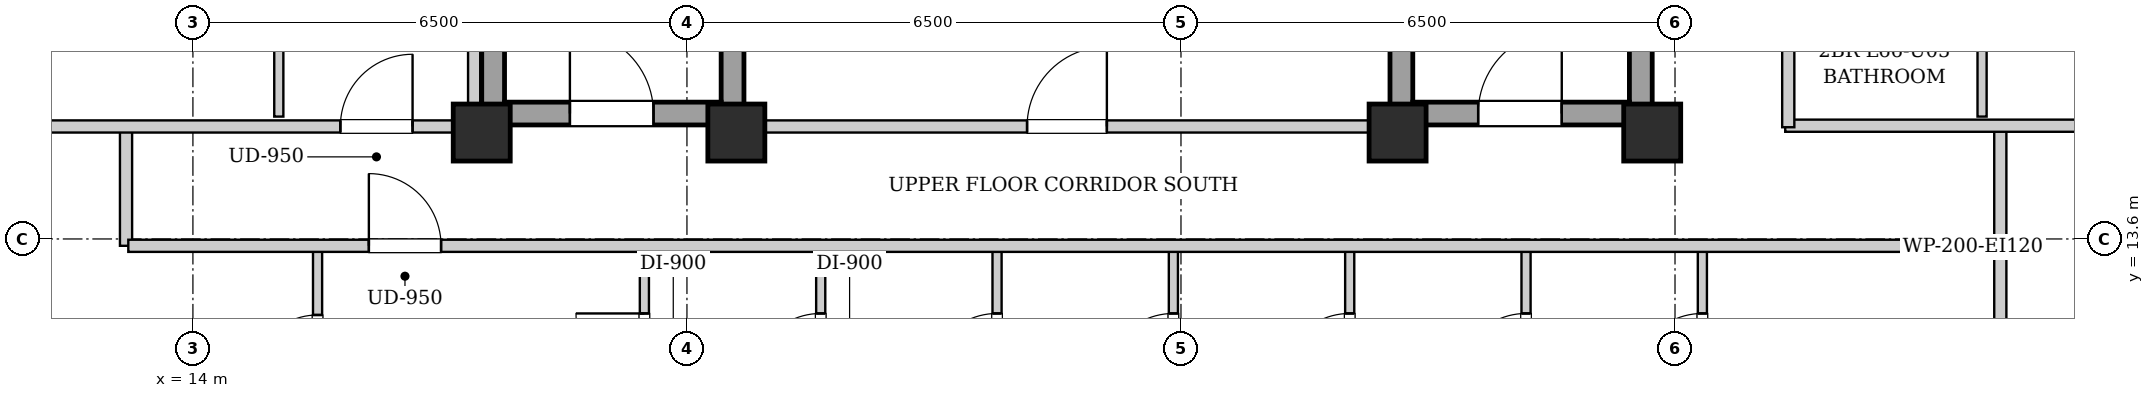
"""IFC4 building model, lengths in metres.
Left out: names, types, materials, properties, quantities, classifications, styles, units other than length and angle.
Written with IfcOpenShell. Run it as: python <this file> out.ifc"""

import sys

from ifc_helpers import new_model, si_unit, direction, frame, frame_2d, origin, origin_2d, place, context, subcontext, project, spatial, rectangle, extrude, element, fill, save


model = new_model("IFC4")
c1 = context("Model", 3, precision=1e-05, world=origin(), true_north=direction((0.0, 1.0)))
c2 = subcontext(c1, "Body", "Model", "MODEL_VIEW")
j1 = project(units=[si_unit("LENGTHUNIT", "METRE"), si_unit("PLANEANGLEUNIT", "RADIAN")], contexts=[c1])
p1 = place(None, origin())
s1 = spatial("IfcSite", under=j1, at=p1, CompositionType="ELEMENT")
p2 = place(p1, origin())
s2 = spatial("IfcBuilding", under=s1, at=p2, CompositionType="ELEMENT")
p3 = place(p2, frame((0.0, 0.0, 227.5)))
s3 = spatial("IfcBuildingStorey", under=s2, at=p3, CompositionType="ELEMENT", Elevation=227.5)
for number, where, z_axis, x_axis in (
    (1, (17.8, 15.0, 0.0), (0.0, 0.0, 1.0), (1.0, 0.0, 0.0)),
    (2, (21.15, 15.0, 0.0), (0.0, 0.0, 1.0), (1.0, 0.0, 0.0)),
    (3, (29.85, 15.0, 0.0), (0.0, 0.0, 1.0), (1.0, 0.0, 0.0)),
    (4, (33.2, 15.0, 0.0), (0.0, 0.0, 1.0), (1.0, 0.0, 0.0)),
):
    element("IfcColumn", number, at=place(p3, frame(where, z_axis=z_axis, x_axis=x_axis)), inside=s3, PredefinedType="COLUMN", context=c2, shape_type="SweptSolid", body=[
        extrude(rectangle(XDim=0.75, YDim=0.75, at=origin_2d()), origin(), (0.0, 0.0, 1.0), 3.4),
    ])
for number, where, z_axis, x_axis in (
    (5, (17.95, 15.1, 0.0), (0.0, 0.0, 1.0), (0.0, 1.0, 0.0)),
    (6, (21.1, 15.1, 0.0), (0.0, 0.0, 1.0), (0.0, 1.0, 0.0)),
):
    element("IfcWall", number, at=place(p3, frame(where, z_axis=z_axis, x_axis=x_axis)), inside=s3, PredefinedType="SHEAR", context=c2, shape_type="SweptSolid", body=[
        extrude(rectangle(XDim=9.0, YDim=0.3, at=frame_2d((4.5, 0.0))), origin(), (0.0, 0.0, 1.0), 3.14),
    ])
p4 = place(p3, frame((18.1, 15.25, 0.0), z_axis=(0.0, 0.0, 1.0), x_axis=(1.0, 0.0, 0.0)))
e7 = element("IfcWall", 7, at=p4, inside=s3, PredefinedType="SHEAR", context=c2, shape_type="SweptSolid", body=[
    extrude(rectangle(XDim=2.85, YDim=0.3, at=frame_2d((1.425, 0.0))), origin(), (0.0, 0.0, 1.0), 3.14),
])
p5 = place(p4, frame((0.86, 0.0, 0.0)))
e8 = element("IfcOpeningElement", 8, at=p5, cuts=e7, PredefinedType="OPENING", context=c2, shape_type="SweptSolid", body=[
    extrude(rectangle(XDim=1.1, YDim=2.05, at=frame_2d((0.55, 1.025))), frame((0.0, 0.16, 0.0), z_axis=(0.0, -1.0, 0.0), x_axis=(1.0, 0.0, 0.0)), (0.0, 0.0, 1.0), 0.32),
])
for number, where, z_axis, x_axis in (
    (9, (29.9, 15.1, 0.0), (0.0, 0.0, 1.0), (0.0, 1.0, 0.0)),
    (10, (33.05, 15.1, 0.0), (0.0, 0.0, 1.0), (0.0, 1.0, 0.0)),
):
    element("IfcWall", number, at=place(p3, frame(where, z_axis=z_axis, x_axis=x_axis)), inside=s3, PredefinedType="SHEAR", context=c2, shape_type="SweptSolid", body=[
        extrude(rectangle(XDim=9.0, YDim=0.3, at=frame_2d((4.5, 0.0))), origin(), (0.0, 0.0, 1.0), 3.14),
    ])
p6 = place(p3, frame((30.05, 15.25, 0.0), z_axis=(0.0, 0.0, 1.0), x_axis=(1.0, 0.0, 0.0)))
e11 = element("IfcWall", 11, at=p6, inside=s3, PredefinedType="SHEAR", context=c2, shape_type="SweptSolid", body=[
    extrude(rectangle(XDim=2.85, YDim=0.3, at=frame_2d((1.425, 0.0))), origin(), (0.0, 0.0, 1.0), 3.14),
])
p7 = place(p6, frame((0.86, 0.0, 0.0)))
e12 = element("IfcOpeningElement", 12, at=p7, cuts=e11, PredefinedType="OPENING", context=c2, shape_type="SweptSolid", body=[
    extrude(rectangle(XDim=1.1, YDim=2.05, at=frame_2d((0.55, 1.025))), frame((0.0, 0.16, 0.0), z_axis=(0.0, -1.0, 0.0), x_axis=(1.0, 0.0, 0.0)), (0.0, 0.0, 1.0), 0.32),
])
p8 = place(p3, frame((21.25, 15.08, 0.0), z_axis=(0.0, 0.0, 1.0), x_axis=(1.0, 0.0, 0.0)))
e13 = element("IfcWall", 13, at=p8, inside=s3, PredefinedType="PARTITIONING", context=c2, shape_type="SweptSolid", body=[
    extrude(rectangle(XDim=8.5, YDim=0.16, at=frame_2d((4.25, 0.0))), origin(), (0.0, 0.0, 1.0), 2.668),
])
p9 = place(p8, frame((3.725, 0.0, 0.0)))
e14 = element("IfcOpeningElement", 14, at=p9, cuts=e13, PredefinedType="OPENING", context=c2, shape_type="SweptSolid", body=[
    extrude(rectangle(XDim=1.05, YDim=2.05, at=frame_2d((0.525, 1.025))), frame((0.0, 0.09, 0.0), z_axis=(0.0, -1.0, 0.0), x_axis=(1.0, 0.0, 0.0)), (0.0, 0.0, 1.0), 0.18),
])
for number, where, z_axis, x_axis in (
    (15, (13.12, 13.51, 0.0), (0.0, 0.0, 1.0), (0.0, 1.0, 0.0)),
    (16, (37.78, 13.51, 0.0), (0.0, 0.0, 1.0), (0.0, 1.0, 0.0)),
):
    element("IfcWall", number, at=place(p3, frame(where, z_axis=z_axis, x_axis=x_axis)), inside=s3, PredefinedType="PARTITIONING", context=c2, shape_type="SweptSolid", body=[
        extrude(rectangle(XDim=1.58, YDim=0.16, at=frame_2d((0.79, 0.0))), origin(), (0.0, 0.0, 1.0), 3.14),
    ])
p10 = place(p3, frame((34.95, 15.09, 0.0), z_axis=(0.0, 0.0, 1.0), x_axis=(1.0, 0.0, 0.0)))
e17 = element("IfcWall", 17, at=p10, inside=s3, PredefinedType="PARTITIONING", context=c2, shape_type="SweptSolid", body=[
    extrude(rectangle(XDim=5.07, YDim=0.16, at=frame_2d((2.535, 0.0))), origin(), (0.0, 0.0, 1.0), 2.668),
])
p11 = place(p3, frame((37.78, 10.81, 0.0), z_axis=(0.0, 0.0, 1.0), x_axis=(0.0, 1.0, 0.0)))
e18 = element("IfcWall", 18, at=p11, inside=s3, PredefinedType="PARTITIONING", context=c2, shape_type="SweptSolid", body=[
    extrude(rectangle(XDim=2.66, YDim=0.16, at=frame_2d((1.33, 0.0))), origin(), (0.0, 0.0, 1.0), 3.14),
])
p12 = place(p3, frame((15.64, 10.87, 0.0), z_axis=(0.0, 0.0, 1.0), x_axis=(0.0, 1.0, 0.0)))
e19 = element("IfcWall", 19, at=p12, inside=s3, PredefinedType="PARTITIONING", context=c2, shape_type="SweptSolid", body=[
    extrude(rectangle(XDim=2.6, YDim=0.12, at=frame_2d((1.3, 0.0))), origin(), (0.0, 0.0, 1.0), 3.14),
])
p13 = place(p12, frame((0.87, 0.0, 0.0)))
e20 = element("IfcOpeningElement", 20, at=p13, cuts=e19, PredefinedType="OPENING", context=c2, shape_type="SweptSolid", body=[
    extrude(rectangle(XDim=0.86, YDim=2.05, at=frame_2d((0.43, 1.025))), frame((0.0, 0.07, 0.0), z_axis=(0.0, -1.0, 0.0), x_axis=(1.0, 0.0, 0.0)), (0.0, 0.0, 1.0), 0.14),
])
p14 = place(p3, frame((19.94, 10.87, 0.0), z_axis=(0.0, 0.0, 1.0), x_axis=(0.0, 1.0, 0.0)))
e21 = element("IfcWall", 21, at=p14, inside=s3, PredefinedType="PARTITIONING", context=c2, shape_type="SweptSolid", body=[
    extrude(rectangle(XDim=2.6, YDim=0.12, at=frame_2d((1.3, 0.0))), origin(), (0.0, 0.0, 1.0), 3.14),
])
p15 = place(p14, frame((0.85, 0.0, 0.0)))
e22 = element("IfcOpeningElement", 22, at=p15, cuts=e21, PredefinedType="OPENING", context=c2, shape_type="SweptSolid", body=[
    extrude(rectangle(XDim=0.9, YDim=2.05, at=frame_2d((0.45, 1.025))), frame((0.0, 0.07, 0.0), z_axis=(0.0, -1.0, 0.0), x_axis=(1.0, 0.0, 0.0)), (0.0, 0.0, 1.0), 0.14),
])
p16 = place(p3, frame((22.26, 10.87, 0.0), z_axis=(0.0, 0.0, 1.0), x_axis=(0.0, 1.0, 0.0)))
e23 = element("IfcWall", 23, at=p16, inside=s3, PredefinedType="PARTITIONING", context=c2, shape_type="SweptSolid", body=[
    extrude(rectangle(XDim=2.6, YDim=0.12, at=frame_2d((1.3, 0.0))), origin(), (0.0, 0.0, 1.0), 3.14),
])
p17 = place(p16, frame((0.85, 0.0, 0.0)))
e24 = element("IfcOpeningElement", 24, at=p17, cuts=e23, PredefinedType="OPENING", context=c2, shape_type="SweptSolid", body=[
    extrude(rectangle(XDim=0.9, YDim=2.05, at=frame_2d((0.45, 1.025))), frame((0.0, 0.07, 0.0), z_axis=(0.0, -1.0, 0.0), x_axis=(1.0, 0.0, 0.0)), (0.0, 0.0, 1.0), 0.14),
])
p18 = place(p3, frame((24.58, 10.87, 0.0), z_axis=(0.0, 0.0, 1.0), x_axis=(0.0, 1.0, 0.0)))
e25 = element("IfcWall", 25, at=p18, inside=s3, PredefinedType="PARTITIONING", context=c2, shape_type="SweptSolid", body=[
    extrude(rectangle(XDim=2.6, YDim=0.12, at=frame_2d((1.3, 0.0))), origin(), (0.0, 0.0, 1.0), 3.14),
])
p19 = place(p18, frame((0.85, 0.0, 0.0)))
e26 = element("IfcOpeningElement", 26, at=p19, cuts=e25, PredefinedType="OPENING", context=c2, shape_type="SweptSolid", body=[
    extrude(rectangle(XDim=0.9, YDim=2.05, at=frame_2d((0.45, 1.025))), frame((0.0, 0.07, 0.0), z_axis=(0.0, -1.0, 0.0), x_axis=(1.0, 0.0, 0.0)), (0.0, 0.0, 1.0), 0.14),
])
p20 = place(p3, frame((26.9, 10.87, 0.0), z_axis=(0.0, 0.0, 1.0), x_axis=(0.0, 1.0, 0.0)))
e27 = element("IfcWall", 27, at=p20, inside=s3, PredefinedType="PARTITIONING", context=c2, shape_type="SweptSolid", body=[
    extrude(rectangle(XDim=2.6, YDim=0.12, at=frame_2d((1.3, 0.0))), origin(), (0.0, 0.0, 1.0), 3.14),
])
p21 = place(p20, frame((0.85, 0.0, 0.0)))
e28 = element("IfcOpeningElement", 28, at=p21, cuts=e27, PredefinedType="OPENING", context=c2, shape_type="SweptSolid", body=[
    extrude(rectangle(XDim=0.9, YDim=2.05, at=frame_2d((0.45, 1.025))), frame((0.0, 0.07, 0.0), z_axis=(0.0, -1.0, 0.0), x_axis=(1.0, 0.0, 0.0)), (0.0, 0.0, 1.0), 0.14),
])
p22 = place(p3, frame((29.22, 10.87, 0.0), z_axis=(0.0, 0.0, 1.0), x_axis=(0.0, 1.0, 0.0)))
e29 = element("IfcWall", 29, at=p22, inside=s3, PredefinedType="PARTITIONING", context=c2, shape_type="SweptSolid", body=[
    extrude(rectangle(XDim=2.6, YDim=0.12, at=frame_2d((1.3, 0.0))), origin(), (0.0, 0.0, 1.0), 3.14),
])
p23 = place(p22, frame((0.85, 0.0, 0.0)))
e30 = element("IfcOpeningElement", 30, at=p23, cuts=e29, PredefinedType="OPENING", context=c2, shape_type="SweptSolid", body=[
    extrude(rectangle(XDim=0.9, YDim=2.05, at=frame_2d((0.45, 1.025))), frame((0.0, 0.07, 0.0), z_axis=(0.0, -1.0, 0.0), x_axis=(1.0, 0.0, 0.0)), (0.0, 0.0, 1.0), 0.14),
])
p24 = place(p3, frame((31.54, 10.87, 0.0), z_axis=(0.0, 0.0, 1.0), x_axis=(0.0, 1.0, 0.0)))
e31 = element("IfcWall", 31, at=p24, inside=s3, PredefinedType="PARTITIONING", context=c2, shape_type="SweptSolid", body=[
    extrude(rectangle(XDim=2.6, YDim=0.12, at=frame_2d((1.3, 0.0))), origin(), (0.0, 0.0, 1.0), 3.14),
])
p25 = place(p24, frame((0.85, 0.0, 0.0)))
e32 = element("IfcOpeningElement", 32, at=p25, cuts=e31, PredefinedType="OPENING", context=c2, shape_type="SweptSolid", body=[
    extrude(rectangle(XDim=0.9, YDim=2.05, at=frame_2d((0.45, 1.025))), frame((0.0, 0.07, 0.0), z_axis=(0.0, -1.0, 0.0), x_axis=(1.0, 0.0, 0.0)), (0.0, 0.0, 1.0), 0.14),
])
p26 = place(p3, frame((33.86, 10.87, 0.0), z_axis=(0.0, 0.0, 1.0), x_axis=(0.0, 1.0, 0.0)))
e33 = element("IfcWall", 33, at=p26, inside=s3, PredefinedType="PARTITIONING", context=c2, shape_type="SweptSolid", body=[
    extrude(rectangle(XDim=2.6, YDim=0.12, at=frame_2d((1.3, 0.0))), origin(), (0.0, 0.0, 1.0), 3.14),
])
p27 = place(p26, frame((0.85, 0.0, 0.0)))
e34 = element("IfcOpeningElement", 34, at=p27, cuts=e33, PredefinedType="OPENING", context=c2, shape_type="SweptSolid", body=[
    extrude(rectangle(XDim=0.9, YDim=2.05, at=frame_2d((0.45, 1.025))), frame((0.0, 0.07, 0.0), z_axis=(0.0, -1.0, 0.0), x_axis=(1.0, 0.0, 0.0)), (0.0, 0.0, 1.0), 0.14),
])
p28 = place(p3, frame((10.88, 15.08, 0.0), z_axis=(0.0, 0.0, 1.0), x_axis=(1.0, 0.0, 0.0)))
e35 = element("IfcWall", 35, at=p28, inside=s3, PredefinedType="PARTITIONING", context=c2, shape_type="SweptSolid", body=[
    extrude(rectangle(XDim=6.88, YDim=0.16, at=frame_2d((3.44, 0.0))), origin(), (0.0, 0.0, 1.0), 2.668),
])
p29 = place(p28, frame((5.06, 0.0, 0.0)))
e36 = element("IfcOpeningElement", 36, at=p29, cuts=e35, PredefinedType="OPENING", context=c2, shape_type="SweptSolid", body=[
    extrude(rectangle(XDim=0.95, YDim=2.1, at=frame_2d((0.475, 1.05))), frame((0.0, 0.09, 0.0), z_axis=(0.0, -1.0, 0.0), x_axis=(1.0, 0.0, 0.0)), (0.0, 0.0, 1.0), 0.18),
])
p30 = place(p3, frame((15.13, 15.21, 0.0), z_axis=(0.0, 0.0, 1.0), x_axis=(0.0, 1.0, 0.0)))
e37 = element("IfcWall", 37, at=p30, inside=s3, PredefinedType="PARTITIONING", context=c2, shape_type="SweptSolid", body=[
    extrude(rectangle(XDim=4.308, YDim=0.12, at=frame_2d((2.154, 0.0))), origin(), (0.0, 0.0, 1.0), 3.14),
])
p31 = place(p30, frame((1.704, 0.0, 0.0)))
e38 = element("IfcOpeningElement", 38, at=p31, cuts=e37, PredefinedType="OPENING", context=c2, shape_type="SweptSolid", body=[
    extrude(rectangle(XDim=0.9, YDim=2.05, at=frame_2d((0.45, 1.025))), frame((0.0, 0.07, 0.0), z_axis=(0.0, -1.0, 0.0), x_axis=(1.0, 0.0, 0.0)), (0.0, 0.0, 1.0), 0.14),
])
p32 = place(p3, frame((37.54, 15.21, 0.0), z_axis=(0.0, 0.0, 1.0), x_axis=(0.0, 1.0, 0.0)))
e39 = element("IfcWall", 39, at=p32, inside=s3, PredefinedType="PARTITIONING", context=c2, shape_type="SweptSolid", body=[
    extrude(rectangle(XDim=2.3, YDim=0.12, at=frame_2d((1.15, 0.0))), origin(), (0.0, 0.0, 1.0), 3.14),
])
p33 = place(p3, frame((13.15, 13.51, 0.0), z_axis=(0.0, 0.0, 1.0), x_axis=(1.0, 0.0, 0.0)))
e40 = element("IfcWall", 40, at=p33, inside=s3, PredefinedType="PARTITIONING", context=c2, shape_type="SweptSolid", body=[
    extrude(rectangle(XDim=24.6, YDim=0.16, at=frame_2d((12.3, 0.0))), origin(), (0.0, 0.0, 1.0), 3.14),
])
p34 = place(p33, frame((3.165, 0.0, 0.0)))
e41 = element("IfcOpeningElement", 41, at=p34, cuts=e40, PredefinedType="OPENING", context=c2, shape_type="SweptSolid", body=[
    extrude(rectangle(XDim=0.95, YDim=2.1, at=frame_2d((0.475, 1.05))), frame((0.0, 0.09, 0.0), z_axis=(0.0, -1.0, 0.0), x_axis=(1.0, 0.0, 0.0)), (0.0, 0.0, 1.0), 0.18),
])
p35 = place(p3, frame((17.7, 15.02, 0.0), z_axis=(0.0, 0.0, 1.0), x_axis=(0.0, 1.0, 0.0)))
e42 = element("IfcWall", 42, at=p35, inside=s3, PredefinedType="PARTITIONING", context=c2, shape_type="SweptSolid", body=[
    extrude(rectangle(XDim=13.98, YDim=0.16, at=frame_2d((6.99, 0.0))), origin(), (0.0, 0.0, 1.0), 2.475),
])
p36 = place(p3, frame((34.99, 15.07, 0.0), z_axis=(0.0, 0.0, 1.0), x_axis=(0.0, 1.0, 0.0)))
e43 = element("IfcWall", 43, at=p36, inside=s3, PredefinedType="PARTITIONING", context=c2, shape_type="SweptSolid", body=[
    extrude(rectangle(XDim=13.93, YDim=0.16, at=frame_2d((6.965, 0.0))), origin(), (0.0, 0.0, 1.0), 3.14),
])
p37 = place(p36, frame((4.385, 0.0, 0.0)))
e44 = element("IfcOpeningElement", 44, at=p37, cuts=e43, PredefinedType="OPENING", context=c2, shape_type="SweptSolid", body=[
    extrude(rectangle(XDim=0.95, YDim=2.1, at=frame_2d((0.475, 1.05))), frame((0.0, 0.09, 0.0), z_axis=(0.0, -1.0, 0.0), x_axis=(1.0, 0.0, 0.0)), (0.0, 0.0, 1.0), 0.18),
])
p38 = place(p5, origin())
e45 = element("IfcDoor", 45, at=p38, inside=s3, OperationType="SINGLE_SWING_LEFT", PredefinedType="DOOR", context=c2, shape_type="SweptSolid", body=[
    extrude(rectangle(XDim=1.1, YDim=2.05, at=frame_2d((0.55, 1.025))), frame((0.0, 0.025, 0.0), z_axis=(0.0, -1.0, 0.0), x_axis=(1.0, 0.0, 0.0)), (0.0, 0.0, 1.0), 0.05),
])
fill(e8, e45)
p39 = place(p7, origin())
e46 = element("IfcDoor", 46, at=p39, inside=s3, OperationType="SINGLE_SWING_RIGHT", PredefinedType="DOOR", context=c2, shape_type="SweptSolid", body=[
    extrude(rectangle(XDim=1.1, YDim=2.05, at=frame_2d((0.55, 1.025))), frame((0.0, 0.025, 0.0), z_axis=(0.0, -1.0, 0.0), x_axis=(1.0, 0.0, 0.0)), (0.0, 0.0, 1.0), 0.05),
])
fill(e12, e46)
p40 = place(p9, origin())
e47 = element("IfcDoor", 47, at=p40, inside=s3, OperationType="SINGLE_SWING_RIGHT", PredefinedType="DOOR", context=c2, shape_type="SweptSolid", body=[
    extrude(rectangle(XDim=1.05, YDim=2.05, at=frame_2d((0.525, 1.025))), frame((0.0, 0.025, 0.0), z_axis=(0.0, -1.0, 0.0), x_axis=(1.0, 0.0, 0.0)), (0.0, 0.0, 1.0), 0.05),
])
fill(e14, e47)
p41 = place(p13, origin())
e48 = element("IfcDoor", 48, at=p41, inside=s3, OperationType="SINGLE_SWING_LEFT", PredefinedType="DOOR", context=c2, shape_type="SweptSolid", body=[
    extrude(rectangle(XDim=0.86, YDim=2.05, at=frame_2d((0.43, 1.025))), frame((0.0, 0.025, 0.0), z_axis=(0.0, -1.0, 0.0), x_axis=(1.0, 0.0, 0.0)), (0.0, 0.0, 1.0), 0.05),
])
fill(e20, e48)
p42 = place(p15, origin())
e49 = element("IfcDoor", 49, at=p42, inside=s3, OperationType="SINGLE_SWING_RIGHT", PredefinedType="DOOR", context=c2, shape_type="SweptSolid", body=[
    extrude(rectangle(XDim=0.9, YDim=2.05, at=frame_2d((0.45, 1.025))), frame((0.0, 0.025, 0.0), z_axis=(0.0, -1.0, 0.0), x_axis=(1.0, 0.0, 0.0)), (0.0, 0.0, 1.0), 0.05),
])
fill(e22, e49)
p43 = place(p17, origin())
e50 = element("IfcDoor", 50, at=p43, inside=s3, OperationType="SINGLE_SWING_LEFT", PredefinedType="DOOR", context=c2, shape_type="SweptSolid", body=[
    extrude(rectangle(XDim=0.9, YDim=2.05, at=frame_2d((0.45, 1.025))), frame((0.0, 0.025, 0.0), z_axis=(0.0, -1.0, 0.0), x_axis=(1.0, 0.0, 0.0)), (0.0, 0.0, 1.0), 0.05),
])
fill(e24, e50)
p44 = place(p19, origin())
e51 = element("IfcDoor", 51, at=p44, inside=s3, OperationType="SINGLE_SWING_LEFT", PredefinedType="DOOR", context=c2, shape_type="SweptSolid", body=[
    extrude(rectangle(XDim=0.9, YDim=2.05, at=frame_2d((0.45, 1.025))), frame((0.0, 0.025, 0.0), z_axis=(0.0, -1.0, 0.0), x_axis=(1.0, 0.0, 0.0)), (0.0, 0.0, 1.0), 0.05),
])
fill(e26, e51)
p45 = place(p21, origin())
e52 = element("IfcDoor", 52, at=p45, inside=s3, OperationType="SINGLE_SWING_LEFT", PredefinedType="DOOR", context=c2, shape_type="SweptSolid", body=[
    extrude(rectangle(XDim=0.9, YDim=2.05, at=frame_2d((0.45, 1.025))), frame((0.0, 0.025, 0.0), z_axis=(0.0, -1.0, 0.0), x_axis=(1.0, 0.0, 0.0)), (0.0, 0.0, 1.0), 0.05),
])
fill(e28, e52)
p46 = place(p23, origin())
e53 = element("IfcDoor", 53, at=p46, inside=s3, OperationType="SINGLE_SWING_LEFT", PredefinedType="DOOR", context=c2, shape_type="SweptSolid", body=[
    extrude(rectangle(XDim=0.9, YDim=2.05, at=frame_2d((0.45, 1.025))), frame((0.0, 0.025, 0.0), z_axis=(0.0, -1.0, 0.0), x_axis=(1.0, 0.0, 0.0)), (0.0, 0.0, 1.0), 0.05),
])
fill(e30, e53)
p47 = place(p25, origin())
e54 = element("IfcDoor", 54, at=p47, inside=s3, OperationType="SINGLE_SWING_LEFT", PredefinedType="DOOR", context=c2, shape_type="SweptSolid", body=[
    extrude(rectangle(XDim=0.9, YDim=2.05, at=frame_2d((0.45, 1.025))), frame((0.0, 0.025, 0.0), z_axis=(0.0, -1.0, 0.0), x_axis=(1.0, 0.0, 0.0)), (0.0, 0.0, 1.0), 0.05),
])
fill(e32, e54)
p48 = place(p27, origin())
e55 = element("IfcDoor", 55, at=p48, inside=s3, OperationType="SINGLE_SWING_LEFT", PredefinedType="DOOR", context=c2, shape_type="SweptSolid", body=[
    extrude(rectangle(XDim=0.9, YDim=2.05, at=frame_2d((0.45, 1.025))), frame((0.0, 0.025, 0.0), z_axis=(0.0, -1.0, 0.0), x_axis=(1.0, 0.0, 0.0)), (0.0, 0.0, 1.0), 0.05),
])
fill(e34, e55)
p49 = place(p29, origin())
e56 = element("IfcDoor", 56, at=p49, inside=s3, OperationType="SINGLE_SWING_RIGHT", PredefinedType="DOOR", context=c2, shape_type="SweptSolid", body=[
    extrude(rectangle(XDim=0.95, YDim=2.1, at=frame_2d((0.475, 1.05))), frame((0.0, 0.025, 0.0), z_axis=(0.0, -1.0, 0.0), x_axis=(1.0, 0.0, 0.0)), (0.0, 0.0, 1.0), 0.05),
])
fill(e36, e56)
p50 = place(p34, origin())
e57 = element("IfcDoor", 57, at=p50, inside=s3, OperationType="SINGLE_SWING_LEFT", PredefinedType="DOOR", context=c2, shape_type="SweptSolid", body=[
    extrude(rectangle(XDim=0.95, YDim=2.1, at=frame_2d((0.475, 1.05))), frame((0.0, 0.025, 0.0), z_axis=(0.0, -1.0, 0.0), x_axis=(1.0, 0.0, 0.0)), (0.0, 0.0, 1.0), 0.05),
])
fill(e41, e57)
save(model, sys.argv[1])
